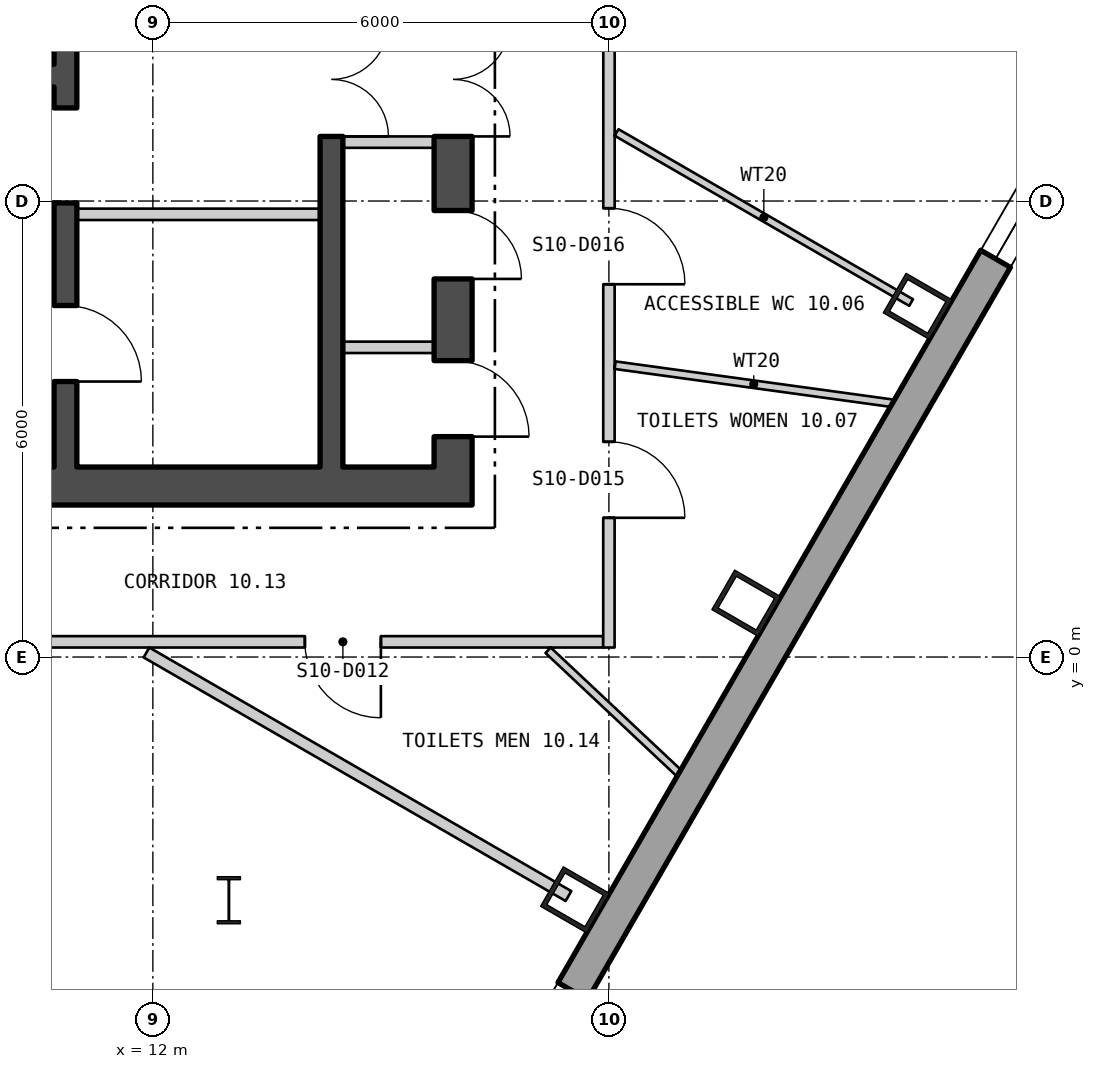
"""IFC4 building model, lengths in metres.
Left out: names, types, materials, properties, quantities, classifications, styles, units other than length and angle.
Written with IfcOpenShell. Run it as: python <this file> out.ifc"""

import sys

from ifc_helpers import new_model, si_unit, direction, frame, frame_2d, origin, origin_2d, place, context, subcontext, project, spatial, polyline, rectangle, hollow_rectangle, i_section, outline, extrude, element, fill, save


model = new_model("IFC4")
c1 = context("Model", 3, precision=1e-05, world=origin(), true_north=direction((0.0, 1.0)))
c2 = subcontext(c1, "Body", "Model", "MODEL_VIEW")
j1 = project(units=[si_unit("LENGTHUNIT", "METRE"), si_unit("PLANEANGLEUNIT", "RADIAN")], contexts=[c1])
p1 = place(None, origin())
s1 = spatial("IfcSite", under=j1, at=p1, CompositionType="ELEMENT")
p2 = place(p1, origin())
s2 = spatial("IfcBuilding", under=s1, at=p2, CompositionType="ELEMENT")
p3 = place(p2, frame((0.0, 0.0, 139.8)))
s3 = spatial("IfcBuildingStorey", under=s2, at=p3, CompositionType="ELEMENT", Elevation=139.8)
for number, where, z_axis, x_axis in (
    (1, (17.554, -3.195, 0.0), (0.0, 0.0, 1.0), (0.5, 0.866, 0.0)),
    (2, (19.808, 0.709, 0.0), (0.0, 0.0, 1.0), (0.5, 0.866, 0.0)),
    (3, (22.063, 4.614, 0.0), (0.0, 0.0, 1.0), (0.5, 0.866, 0.0)),
):
    element("IfcColumn", number, at=place(p3, frame(where, z_axis=z_axis, x_axis=x_axis)), inside=s3, PredefinedType="COLUMN", context=c2, shape_type="SweptSolid", body=[
        extrude(hollow_rectangle(XDim=0.6, YDim=0.7, WallThickness=0.06, at=origin_2d()), origin(), (0.0, 0.0, 1.0), 3.9),
    ])
p4 = place(p3, frame((13.0, -3.2, 0.0), z_axis=(0.0, 0.0, 1.0), x_axis=(1.0, 0.0, 0.0)))
e4 = element("IfcColumn", 4, at=p4, inside=s3, PredefinedType="COLUMN", context=c2, shape_type="SweptSolid", body=[
    extrude(i_section(OverallWidth=0.305, OverallDepth=0.62, WebThickness=0.021, FlangeThickness=0.04, at=origin_2d()), origin(), (0.0, 0.0, 1.0), 3.9),
])
p5 = place(p3, frame((4.36, -27.198, -0.18), z_axis=(0.0, 0.0, 1.0), x_axis=(0.500000335318, 0.866025210188, 0.0)))
e5 = element("IfcWall", 5, at=p5, inside=s3, PredefinedType="SOLIDWALL", context=c2, shape_type="SweptSolid", body=[
    extrude(outline(polyline([(-0.13, -0.225), (45.88, -0.225), (45.62, 0.225), (0.13, 0.225), (-0.13, -0.225)])), origin(), (0.0, 0.0, 1.0), 3.68),
])
p6 = place(p5, frame((1.425, 0.0, 1.08)))
e6 = element("IfcOpeningElement", 6, at=p6, cuts=e5, PredefinedType="OPENING", context=c2, shape_type="SweptSolid", body=[
    extrude(rectangle(XDim=2.4, YDim=2.0, at=frame_2d((1.2, 1.0))), frame((0.0, 0.235, 0.0), z_axis=(0.0, -1.0, 0.0), x_axis=(1.0, 0.0, 0.0)), (0.0, 0.0, 1.0), 0.47),
])
p7 = place(p5, frame((5.895, 0.0, 1.08)))
e7 = element("IfcOpeningElement", 7, at=p7, cuts=e5, PredefinedType="OPENING", context=c2, shape_type="SweptSolid", body=[
    extrude(rectangle(XDim=2.4, YDim=2.0, at=frame_2d((1.2, 1.0))), frame((0.0, 0.235, 0.0), z_axis=(0.0, -1.0, 0.0), x_axis=(1.0, 0.0, 0.0)), (0.0, 0.0, 1.0), 0.47),
])
p8 = place(p5, frame((10.403, 0.0, 1.08)))
e8 = element("IfcOpeningElement", 8, at=p8, cuts=e5, PredefinedType="OPENING", context=c2, shape_type="SweptSolid", body=[
    extrude(rectangle(XDim=2.4, YDim=2.0, at=frame_2d((1.2, 1.0))), frame((0.0, 0.235, 0.0), z_axis=(0.0, -1.0, 0.0), x_axis=(1.0, 0.0, 0.0)), (0.0, 0.0, 1.0), 0.47),
])
p9 = place(p5, frame((14.912, 0.0, 1.08)))
e9 = element("IfcOpeningElement", 9, at=p9, cuts=e5, PredefinedType="OPENING", context=c2, shape_type="SweptSolid", body=[
    extrude(rectangle(XDim=2.4, YDim=2.0, at=frame_2d((1.2, 1.0))), frame((0.0, 0.235, 0.0), z_axis=(0.0, -1.0, 0.0), x_axis=(1.0, 0.0, 0.0)), (0.0, 0.0, 1.0), 0.47),
])
p10 = place(p5, frame((19.421, 0.0, 1.08)))
e10 = element("IfcOpeningElement", 10, at=p10, cuts=e5, PredefinedType="OPENING", context=c2, shape_type="SweptSolid", body=[
    extrude(rectangle(XDim=2.4, YDim=2.0, at=frame_2d((1.2, 1.0))), frame((0.0, 0.235, 0.0), z_axis=(0.0, -1.0, 0.0), x_axis=(1.0, 0.0, 0.0)), (0.0, 0.0, 1.0), 0.47),
])
p11 = place(p5, frame((23.929, 0.0, 1.08)))
e11 = element("IfcOpeningElement", 11, at=p11, cuts=e5, PredefinedType="OPENING", context=c2, shape_type="SweptSolid", body=[
    extrude(rectangle(XDim=2.4, YDim=2.0, at=frame_2d((1.2, 1.0))), frame((0.0, 0.235, 0.0), z_axis=(0.0, -1.0, 0.0), x_axis=(1.0, 0.0, 0.0)), (0.0, 0.0, 1.0), 0.47),
])
p12 = place(p5, frame((37.455, 0.0, 1.08)))
e12 = element("IfcOpeningElement", 12, at=p12, cuts=e5, PredefinedType="OPENING", context=c2, shape_type="SweptSolid", body=[
    extrude(rectangle(XDim=2.4, YDim=2.0, at=frame_2d((1.2, 1.0))), frame((0.0, 0.235, 0.0), z_axis=(0.0, -1.0, 0.0), x_axis=(1.0, 0.0, 0.0)), (0.0, 0.0, 1.0), 0.47),
])
p13 = place(p5, frame((41.925, 0.0, 1.08)))
e13 = element("IfcOpeningElement", 13, at=p13, cuts=e5, PredefinedType="OPENING", context=c2, shape_type="SweptSolid", body=[
    extrude(rectangle(XDim=2.4, YDim=2.0, at=frame_2d((1.2, 1.0))), frame((0.0, 0.235, 0.0), z_axis=(0.0, -1.0, 0.0), x_axis=(1.0, 0.0, 0.0)), (0.0, 0.0, 1.0), 0.47),
])
p14 = place(p3, frame((-16.2, 2.25, 0.0), z_axis=(0.0, 0.0, 1.0), x_axis=(1.0, 0.0, 0.0)))
e14 = element("IfcWall", 14, at=p14, inside=s3, PredefinedType="SHEAR", context=c2, shape_type="SweptSolid", body=[
    extrude(rectangle(XDim=32.4, YDim=0.5, at=frame_2d((16.2, 0.0))), origin(), (0.0, 0.0, 1.0), 3.7),
])
p15 = place(p14, frame((10.7, 0.0, 0.0)))
e15 = element("IfcOpeningElement", 15, at=p15, cuts=e14, PredefinedType="OPENING", context=c2, shape_type="SweptSolid", body=[
    extrude(rectangle(XDim=1.8, YDim=2.4, at=frame_2d((0.9, 1.2))), frame((0.0, 0.26, 0.0), z_axis=(0.0, -1.0, 0.0), x_axis=(1.0, 0.0, 0.0)), (0.0, 0.0, 1.0), 0.52),
])
p16 = place(p14, frame((20.7, 0.0, 0.0)))
e16 = element("IfcOpeningElement", 16, at=p16, cuts=e14, PredefinedType="OPENING", context=c2, shape_type="SweptSolid", body=[
    extrude(rectangle(XDim=1.8, YDim=2.4, at=frame_2d((0.9, 1.2))), frame((0.0, 0.26, 0.0), z_axis=(0.0, -1.0, 0.0), x_axis=(1.0, 0.0, 0.0)), (0.0, 0.0, 1.0), 0.52),
])
p17 = place(p3, frame((15.95, 2.5, 0.0), z_axis=(0.0, 0.0, 1.0), x_axis=(0.0, 1.0, 0.0)))
e17 = element("IfcWall", 17, at=p17, inside=s3, PredefinedType="SHEAR", context=c2, shape_type="SweptSolid", body=[
    extrude(rectangle(XDim=15.0, YDim=0.5, at=frame_2d((7.5, 0.0))), origin(), (0.0, 0.0, 1.0), 3.7),
])
p18 = place(p17, frame((4.35, 0.0, 0.0)))
e18 = element("IfcOpeningElement", 18, at=p18, cuts=e17, PredefinedType="OPENING", context=c2, shape_type="SweptSolid", body=[
    extrude(rectangle(XDim=1.5, YDim=2.1, at=frame_2d((0.75, 1.05))), frame((0.0, 0.26, 0.0), z_axis=(0.0, -1.0, 0.0), x_axis=(1.0, 0.0, 0.0)), (0.0, 0.0, 1.0), 0.52),
])
p19 = place(p17, frame((0.4, 0.0, 0.0)))
e19 = element("IfcOpeningElement", 19, at=p19, cuts=e17, PredefinedType="OPENING", context=c2, shape_type="SweptSolid", body=[
    extrude(rectangle(XDim=1.0, YDim=2.1, at=frame_2d((0.5, 1.05))), frame((0.0, 0.26, 0.0), z_axis=(0.0, -1.0, 0.0), x_axis=(1.0, 0.0, 0.0)), (0.0, 0.0, 1.0), 0.52),
])
p20 = place(p17, frame((2.475, 0.0, 0.0)))
e20 = element("IfcOpeningElement", 20, at=p20, cuts=e17, PredefinedType="OPENING", context=c2, shape_type="SweptSolid", body=[
    extrude(rectangle(XDim=0.9, YDim=2.1, at=frame_2d((0.45, 1.05))), frame((0.0, 0.26, 0.0), z_axis=(0.0, -1.0, 0.0), x_axis=(1.0, 0.0, 0.0)), (0.0, 0.0, 1.0), 0.52),
])
p21 = place(p17, frame((9.001, 0.0, 0.0)))
e21 = element("IfcOpeningElement", 21, at=p21, cuts=e17, PredefinedType="OPENING", context=c2, shape_type="SweptSolid", body=[
    extrude(rectangle(XDim=0.9, YDim=2.1, at=frame_2d((0.45, 1.05))), frame((0.0, 0.26, 0.0), z_axis=(0.0, -1.0, 0.0), x_axis=(1.0, 0.0, 0.0)), (0.0, 0.0, 1.0), 0.52),
])
p22 = place(p17, frame((13.576, 0.0, 0.0)))
e22 = element("IfcOpeningElement", 22, at=p22, cuts=e17, PredefinedType="OPENING", context=c2, shape_type="SweptSolid", body=[
    extrude(rectangle(XDim=0.9, YDim=2.1, at=frame_2d((0.45, 1.05))), frame((0.0, 0.26, 0.0), z_axis=(0.0, -1.0, 0.0), x_axis=(1.0, 0.0, 0.0)), (0.0, 0.0, 1.0), 0.52),
])
p23 = place(p3, frame((10.85, 2.5, 0.0), z_axis=(0.0, 0.0, 1.0), x_axis=(0.0, 1.0, 0.0)))
e23 = element("IfcWall", 23, at=p23, inside=s3, PredefinedType="SHEAR", context=c2, shape_type="SweptSolid", body=[
    extrude(rectangle(XDim=15.0, YDim=0.3, at=frame_2d((7.5, 0.0))), origin(), (0.0, 0.0, 1.0), 3.7),
])
p24 = place(p23, frame((3.475, 0.0, 0.0)))
e24 = element("IfcOpeningElement", 24, at=p24, cuts=e23, PredefinedType="OPENING", context=c2, shape_type="SweptSolid", body=[
    extrude(rectangle(XDim=1.25, YDim=2.1, at=frame_2d((0.625, 1.05))), frame((0.0, 0.16, 0.0), z_axis=(0.0, -1.0, 0.0), x_axis=(1.0, 0.0, 0.0)), (0.0, 0.0, 1.0), 0.32),
])
p25 = place(p23, frame((1.125, 0.0, 0.0)))
e25 = element("IfcOpeningElement", 25, at=p25, cuts=e23, PredefinedType="OPENING", context=c2, shape_type="SweptSolid", body=[
    extrude(rectangle(XDim=1.0, YDim=2.1, at=frame_2d((0.5, 1.05))), frame((0.0, 0.16, 0.0), z_axis=(0.0, -1.0, 0.0), x_axis=(1.0, 0.0, 0.0)), (0.0, 0.0, 1.0), 0.32),
])
p26 = place(p3, frame((14.35, 2.5, 0.0), z_axis=(0.0, 0.0, 1.0), x_axis=(0.0, 1.0, 0.0)))
e26 = element("IfcWall", 26, at=p26, inside=s3, PredefinedType="SHEAR", context=c2, shape_type="SweptSolid", body=[
    extrude(rectangle(XDim=15.0, YDim=0.3, at=frame_2d((7.5, 0.0))), origin(), (0.0, 0.0, 1.0), 3.7),
])
p27 = place(p26, frame((4.35, 0.0, 0.0)))
e27 = element("IfcOpeningElement", 27, at=p27, cuts=e26, PredefinedType="OPENING", context=c2, shape_type="SweptSolid", body=[
    extrude(rectangle(XDim=1.5, YDim=2.1, at=frame_2d((0.75, 1.05))), frame((0.0, 0.16, 0.0), z_axis=(0.0, -1.0, 0.0), x_axis=(1.0, 0.0, 0.0)), (0.0, 0.0, 1.0), 0.32),
])
p28 = place(p3, frame((2.6, 7.65, 0.0), z_axis=(0.0, 0.0, 1.0), x_axis=(1.0, 0.0, 0.0)))
e28 = element("IfcWall", 28, at=p28, inside=s3, PredefinedType="SHEAR", context=c2, shape_type="SweptSolid", body=[
    extrude(rectangle(XDim=8.1, YDim=0.3, at=frame_2d((4.05, 0.0))), origin(), (0.0, 0.0, 1.0), 3.7),
])
p29 = place(p3, frame((11.0, 5.825, 0.0), z_axis=(0.0, 0.0, 1.0), x_axis=(1.0, 0.0, 0.0)))
e29 = element("IfcWall", 29, at=p29, inside=s3, PredefinedType="PARTITIONING", context=c2, shape_type="SweptSolid", body=[
    extrude(rectangle(XDim=3.2, YDim=0.15, at=frame_2d((1.6, 0.0))), origin(), (0.0, 0.0, 1.0), 3.7),
])
for number, where, z_axis, x_axis in (
    (30, (14.5, 6.775, 0.0), (0.0, 0.0, 1.0), (1.0, 0.0, 0.0)),
    (31, (14.5, 4.075, 0.0), (0.0, 0.0, 1.0), (1.0, 0.0, 0.0)),
):
    element("IfcWall", number, at=place(p3, frame(where, z_axis=z_axis, x_axis=x_axis)), inside=s3, PredefinedType="PARTITIONING", context=c2, shape_type="SweptSolid", body=[
        extrude(rectangle(XDim=1.2, YDim=0.15, at=frame_2d((0.6, 0.0))), origin(), (0.0, 0.0, 1.0), 3.7),
    ])
p30 = place(p3, frame((7.25, 0.2, 0.0), z_axis=(0.0, 0.0, 1.0), x_axis=(1.0, 0.0, 0.0)))
e32 = element("IfcWall", 32, at=p30, inside=s3, PredefinedType="PARTITIONING", context=c2, shape_type="SweptSolid", body=[
    extrude(rectangle(XDim=10.675, YDim=0.15, at=frame_2d((5.338, 0.0))), origin(), (0.0, 0.0, 1.0), 3.7),
])
p31 = place(p30, frame((6.75, 0.0, 0.0)))
e33 = element("IfcOpeningElement", 33, at=p31, cuts=e32, PredefinedType="OPENING", context=c2, shape_type="SweptSolid", body=[
    extrude(rectangle(XDim=1.0, YDim=2.1, at=frame_2d((0.5, 1.05))), frame((0.0, 0.085, 0.0), z_axis=(0.0, -1.0, 0.0), x_axis=(1.0, 0.0, 0.0)), (0.0, 0.0, 1.0), 0.17),
])
p32 = place(p3, frame((11.916, 0.06, 0.0), z_axis=(0.0, 0.0, 1.0), x_axis=(0.866055709532, -0.499947505232, 0.0)))
e34 = element("IfcWall", 34, at=p32, inside=s3, PredefinedType="PARTITIONING", context=c2, shape_type="SweptSolid", body=[
    extrude(rectangle(XDim=6.411, YDim=0.15, at=frame_2d((3.205, 0.0))), origin(), (0.0, 0.0, 1.0), 3.7),
])
p33 = place(p3, frame((17.2, 0.089, 0.0), z_axis=(0.0, 0.0, 1.0), x_axis=(0.728995381281, -0.684518614846, 0.0)))
e35 = element("IfcWall", 35, at=p33, inside=s3, PredefinedType="PARTITIONING", context=c2, shape_type="SweptSolid", body=[
    extrude(rectangle(XDim=2.361, YDim=0.1, at=frame_2d((1.18, 0.0))), origin(), (0.0, 0.0, 1.0), 3.7),
])
p34 = place(p3, frame((18.0, 0.125, 0.0), z_axis=(0.0, 0.0, 1.0), x_axis=(0.000166638891, 0.999999986116, 0.0)))
e36 = element("IfcWall", 36, at=p34, inside=s3, PredefinedType="PARTITIONING", context=c2, shape_type="SweptSolid", body=[
    extrude(rectangle(XDim=12.002, YDim=0.15, at=frame_2d((6.001, 0.0))), origin(), (0.0, 0.0, 1.0), 3.7),
])
p35 = place(p34, frame((1.707, 0.0, 0.0)))
e37 = element("IfcOpeningElement", 37, at=p35, cuts=e36, PredefinedType="OPENING", context=c2, shape_type="SweptSolid", body=[
    extrude(rectangle(XDim=1.0, YDim=2.1, at=frame_2d((0.5, 1.05))), frame((0.0, 0.085, 0.0), z_axis=(0.0, -1.0, 0.0), x_axis=(1.0, 0.0, 0.0)), (0.0, 0.0, 1.0), 0.17),
])
p36 = place(p34, frame((4.78, 0.0, 0.0)))
e38 = element("IfcOpeningElement", 38, at=p36, cuts=e36, PredefinedType="OPENING", context=c2, shape_type="SweptSolid", body=[
    extrude(rectangle(XDim=1.0, YDim=2.1, at=frame_2d((0.5, 1.05))), frame((0.0, 0.085, 0.0), z_axis=(0.0, -1.0, 0.0), x_axis=(1.0, 0.0, 0.0)), (0.0, 0.0, 1.0), 0.17),
])
p37 = place(p3, frame((18.082, 3.84, 0.0), z_axis=(0.0, 0.0, 1.0), x_axis=(0.990695786663, -0.136095034033, 0.0)))
e39 = element("IfcWall", 39, at=p37, inside=s3, PredefinedType="PARTITIONING", context=c2, shape_type="SweptSolid", body=[
    extrude(rectangle(XDim=3.681, YDim=0.1, at=frame_2d((1.841, 0.0))), origin(), (0.0, 0.0, 1.0), 3.7),
])
p38 = place(p3, frame((18.101, 6.902, 0.0), z_axis=(0.0, 0.0, 1.0), x_axis=(0.865951106384, -0.500128664797, 0.0)))
e40 = element("IfcWall", 40, at=p38, inside=s3, PredefinedType="PARTITIONING", context=c2, shape_type="SweptSolid", body=[
    extrude(rectangle(XDim=4.475, YDim=0.1, at=frame_2d((2.237, 0.0))), origin(), (0.0, 0.0, 1.0), 3.7),
])
p39 = place(p11, origin())
e41 = element("IfcWindow", 41, at=p39, inside=s3, PartitioningType="SINGLE_PANEL", PredefinedType="WINDOW", context=c2, shape_type="SweptSolid", body=[
    extrude(rectangle(XDim=2.4, YDim=2.0, at=frame_2d((1.2, 1.0))), frame((0.0, 0.105, 0.0), z_axis=(0.0, -1.0, 0.0), x_axis=(1.0, 0.0, 0.0)), (0.0, 0.0, 1.0), 0.06),
])
fill(e11, e41)
p40 = place(p12, origin())
e42 = element("IfcWindow", 42, at=p40, inside=s3, PartitioningType="SINGLE_PANEL", PredefinedType="WINDOW", context=c2, shape_type="SweptSolid", body=[
    extrude(rectangle(XDim=2.4, YDim=2.0, at=frame_2d((1.2, 1.0))), frame((0.0, 0.105, 0.0), z_axis=(0.0, -1.0, 0.0), x_axis=(1.0, 0.0, 0.0)), (0.0, 0.0, 1.0), 0.06),
])
fill(e12, e42)
p41 = place(p24, origin())
e43 = element("IfcDoor", 43, at=p41, inside=s3, OperationType="SINGLE_SWING_RIGHT", PredefinedType="DOOR", context=c2, shape_type="SweptSolid", body=[
    extrude(rectangle(XDim=1.25, YDim=2.1, at=frame_2d((0.625, 1.05))), frame((0.0, 0.025, 0.0), z_axis=(0.0, -1.0, 0.0), x_axis=(1.0, 0.0, 0.0)), (0.0, 0.0, 1.0), 0.05),
])
fill(e24, e43)
p42 = place(p25, origin())
e44 = element("IfcDoor", 44, at=p42, inside=s3, OperationType="SINGLE_SWING_LEFT", PredefinedType="DOOR", context=c2, shape_type="SweptSolid", body=[
    extrude(rectangle(XDim=1.0, YDim=2.1, at=frame_2d((0.5, 1.05))), frame((0.0, 0.025, 0.0), z_axis=(0.0, -1.0, 0.0), x_axis=(1.0, 0.0, 0.0)), (0.0, 0.0, 1.0), 0.05),
])
fill(e25, e44)
p43 = place(p27, origin())
e45 = element("IfcDoor", 45, at=p43, inside=s3, OperationType="DOUBLE_DOOR_SINGLE_SWING", PredefinedType="DOOR", context=c2, shape_type="SweptSolid", body=[
    extrude(rectangle(XDim=1.5, YDim=2.1, at=frame_2d((0.75, 1.05))), frame((0.0, 0.025, 0.0), z_axis=(0.0, -1.0, 0.0), x_axis=(1.0, 0.0, 0.0)), (0.0, 0.0, 1.0), 0.05),
])
fill(e27, e45)
p44 = place(p18, origin())
e46 = element("IfcDoor", 46, at=p44, inside=s3, OperationType="DOUBLE_DOOR_SINGLE_SWING", PredefinedType="DOOR", context=c2, shape_type="SweptSolid", body=[
    extrude(rectangle(XDim=1.5, YDim=2.1, at=frame_2d((0.75, 1.05))), frame((0.0, 0.025, 0.0), z_axis=(0.0, -1.0, 0.0), x_axis=(1.0, 0.0, 0.0)), (0.0, 0.0, 1.0), 0.05),
])
fill(e18, e46)
p45 = place(p19, origin())
e47 = element("IfcDoor", 47, at=p45, inside=s3, OperationType="SINGLE_SWING_LEFT", PredefinedType="DOOR", context=c2, shape_type="SweptSolid", body=[
    extrude(rectangle(XDim=1.0, YDim=2.1, at=frame_2d((0.5, 1.05))), frame((0.0, 0.025, 0.0), z_axis=(0.0, -1.0, 0.0), x_axis=(1.0, 0.0, 0.0)), (0.0, 0.0, 1.0), 0.05),
])
fill(e19, e47)
p46 = place(p20, origin())
e48 = element("IfcDoor", 48, at=p46, inside=s3, OperationType="SINGLE_SWING_LEFT", PredefinedType="DOOR", context=c2, shape_type="SweptSolid", body=[
    extrude(rectangle(XDim=0.9, YDim=2.1, at=frame_2d((0.45, 1.05))), frame((0.0, 0.025, 0.0), z_axis=(0.0, -1.0, 0.0), x_axis=(1.0, 0.0, 0.0)), (0.0, 0.0, 1.0), 0.05),
])
fill(e20, e48)
p47 = place(p31, origin())
e49 = element("IfcDoor", 49, at=p47, inside=s3, OperationType="SINGLE_SWING_RIGHT", PredefinedType="DOOR", context=c2, shape_type="SweptSolid", body=[
    extrude(rectangle(XDim=1.0, YDim=2.1, at=frame_2d((0.5, 1.05))), frame((0.0, 0.025, 0.0), z_axis=(0.0, -1.0, 0.0), x_axis=(1.0, 0.0, 0.0)), (0.0, 0.0, 1.0), 0.05),
])
fill(e33, e49)
p48 = place(p35, origin())
e50 = element("IfcDoor", 50, at=p48, inside=s3, OperationType="SINGLE_SWING_LEFT", PredefinedType="DOOR", context=c2, shape_type="SweptSolid", body=[
    extrude(rectangle(XDim=1.0, YDim=2.1, at=frame_2d((0.5, 1.05))), frame((0.0, 0.025, 0.0), z_axis=(0.0, -1.0, 0.0), x_axis=(1.0, 0.0, 0.0)), (0.0, 0.0, 1.0), 0.05),
])
fill(e37, e50)
p49 = place(p36, origin())
e51 = element("IfcDoor", 51, at=p49, inside=s3, OperationType="SINGLE_SWING_LEFT", PredefinedType="DOOR", context=c2, shape_type="SweptSolid", body=[
    extrude(rectangle(XDim=1.0, YDim=2.1, at=frame_2d((0.5, 1.05))), frame((0.0, 0.025, 0.0), z_axis=(0.0, -1.0, 0.0), x_axis=(1.0, 0.0, 0.0)), (0.0, 0.0, 1.0), 0.05),
])
fill(e38, e51)
save(model, sys.argv[1])
